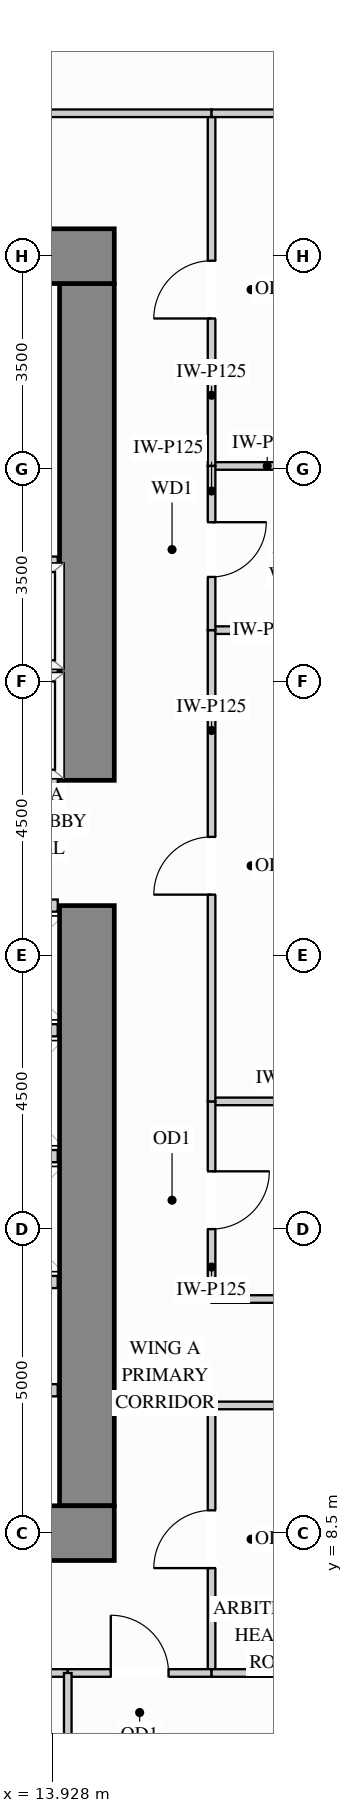
"""IFC4 building model, lengths in metres.
Left out: names, types, materials, properties, quantities, classifications, styles, units other than length and angle.
Written with IfcOpenShell. Run it as: python <this file> out.ifc"""

import sys

from ifc_helpers import new_model, si_unit, direction, frame, frame_2d, origin, place, context, subcontext, project, spatial, rectangle, extrude, source, transform, mapped, element, fill, save


model = new_model("IFC4")
c1 = context("Model", 3, precision=1e-05, world=origin(), true_north=direction((0.0, 1.0)))
c2 = subcontext(c1, "Body", "Model", "MODEL_VIEW")
j1 = project(units=[si_unit("LENGTHUNIT", "METRE"), si_unit("PLANEANGLEUNIT", "RADIAN")], contexts=[c1])
p1 = place(None, origin())
s1 = spatial("IfcSite", under=j1, at=p1, CompositionType="ELEMENT")
p2 = place(p1, origin())
s2 = spatial("IfcBuilding", under=s1, at=p2, CompositionType="ELEMENT")
p3 = place(p2, frame((0.0, 0.0, 51.3)))
s3 = spatial("IfcBuildingStorey", under=s2, at=p3, CompositionType="ELEMENT", Elevation=51.3)
m1 = source(origin(), c2, "Body", "SweptSolid", [
    extrude(rectangle(XDim=9.87, YDim=0.9, at=frame_2d((4.935, 0.0))), origin(), (0.0, 0.0, 1.0), 3.38),
])
p4 = place(p3, frame((14.5, 8.95, 0.0), z_axis=(0.0, 0.0, 1.0), x_axis=(0.0, 1.0, 0.0)))
e1 = element("IfcWall", 1, at=p4, inside=s3, PredefinedType="SHEAR", context=c2, shape_type="MappedRepresentation", body=[
    mapped(m1, transform((0.0, 0.0, 0.0), x_axis=(1.0, 0.0, 0.0), y_axis=(0.0, 1.0, 0.0), z_axis=(0.0, 0.0, 1.0))),
])
m2 = source(origin(), c2, "Body", "SweptSolid", [
    extrude(rectangle(XDim=8.17, YDim=0.9, at=frame_2d((4.085, 0.0))), origin(), (0.0, 0.0, 1.0), 3.38),
])
p5 = place(p3, frame((14.5, 20.88, 0.0), z_axis=(0.0, 0.0, 1.0), x_axis=(0.0, 1.0, 0.0)))
e2 = element("IfcWall", 2, at=p5, inside=s3, PredefinedType="SHEAR", context=c2, shape_type="MappedRepresentation", body=[
    mapped(m2, transform((0.0, 0.0, 0.0), x_axis=(1.0, 0.0, 0.0), y_axis=(0.0, 1.0, 0.0), z_axis=(0.0, 0.0, 1.0))),
])
m3 = source(origin(), c2, "Body", "SweptSolid", [
    extrude(rectangle(XDim=10.9, YDim=0.9, at=frame_2d((5.45, 0.0))), origin(), (0.0, 0.0, 1.0), 3.38),
])
for number, where, z_axis, x_axis in (
    (3, (4.05, 29.5, 0.0), (0.0, 0.0, 1.0), (1.0, 0.0, 0.0)),
    (4, (4.05, 8.5, 0.0), (0.0, 0.0, 1.0), (1.0, 0.0, 0.0)),
):
    element("IfcWall", number, at=place(p3, frame(where, z_axis=z_axis, x_axis=x_axis)), inside=s3, PredefinedType="SHEAR", context=c2, shape_type="MappedRepresentation", body=[
        mapped(m3, transform((0.0, 0.0, 0.0), x_axis=(1.0, 0.0, 0.0), y_axis=(0.0, 1.0, 0.0), z_axis=(0.0, 0.0, 1.0))),
    ])
m4 = source(origin(), c2, "Body", "SweptSolid", [
    extrude(rectangle(XDim=2.6, YDim=0.125, at=frame_2d((1.3, 0.0))), origin(), (0.0, 0.0, 1.0), 3.365),
])
p6 = place(p3, frame((16.55, 15.6, 0.0), z_axis=(0.0, 0.0, 1.0), x_axis=(1.0, 0.0, 0.0)))
e5 = element("IfcWall", 5, at=p6, inside=s3, PredefinedType="PARTITIONING", context=c2, shape_type="MappedRepresentation", body=[
    mapped(m4, transform((0.0, 0.0, 0.0), x_axis=(1.0, 0.0, 0.0), y_axis=(0.0, 1.0, 0.0), z_axis=(0.0, 0.0, 1.0))),
])
m5 = source(origin(), c2, "Body", "SweptSolid", [
    extrude(rectangle(XDim=2.598, YDim=0.125, at=frame_2d((1.299, 0.0))), origin(), (0.0, 0.0, 1.0), 3.365),
])
for number, where, z_axis, x_axis in (
    (6, (16.55, 23.35, 0.0), (0.0, 0.0, 1.0), (1.0, 0.0, 0.0)),
    (7, (16.55, 26.05, 0.0), (0.0, 0.0, 1.0), (1.0, 0.0, 0.0)),
):
    element("IfcWall", number, at=place(p3, frame(where, z_axis=z_axis, x_axis=x_axis)), inside=s3, PredefinedType="PARTITIONING", context=c2, shape_type="MappedRepresentation", body=[
        mapped(m5, transform((0.0, 0.0, 0.0), x_axis=(1.0, 0.0, 0.0), y_axis=(0.0, 1.0, 0.0), z_axis=(0.0, 0.0, 1.0))),
    ])
p7 = place(p3, frame((16.55, 12.35, 0.0), z_axis=(0.0, 0.0, 1.0), x_axis=(0.0, 1.0, 0.0)))
e8 = element("IfcWall", 8, at=p7, inside=s3, PredefinedType="PARTITIONING", context=c2, shape_type="SweptSolid", body=[
    extrude(rectangle(XDim=3.25, YDim=0.125, at=frame_2d((1.625, 0.0))), origin(), (0.0, 0.0, 1.0), 3.365),
])
p8 = place(p7, frame((1.15, 0.0, 0.0)))
e9 = element("IfcOpeningElement", 9, at=p8, cuts=e8, PredefinedType="OPENING", context=c2, shape_type="SweptSolid", body=[
    extrude(rectangle(XDim=0.95, YDim=2.15, at=frame_2d((0.475, 1.075))), frame((0.0, 0.073, 0.0), z_axis=(0.0, -1.0, 0.0), x_axis=(1.0, 0.0, 0.0)), (0.0, 0.0, 1.0), 0.145),
])
p9 = place(p3, frame((16.55, 15.6, 0.0), z_axis=(0.0, 0.0, 1.0), x_axis=(0.0, 1.0, 0.0)))
e10 = element("IfcWall", 10, at=p9, inside=s3, PredefinedType="PARTITIONING", context=c2, shape_type="SweptSolid", body=[
    extrude(rectangle(XDim=7.75, YDim=0.125, at=frame_2d((3.875, 0.0))), origin(), (0.0, 0.0, 1.0), 3.365),
])
p10 = place(p9, frame((3.4, 0.0, 0.0)))
e11 = element("IfcOpeningElement", 11, at=p10, cuts=e10, PredefinedType="OPENING", context=c2, shape_type="SweptSolid", body=[
    extrude(rectangle(XDim=0.95, YDim=2.15, at=frame_2d((0.475, 1.075))), frame((0.0, 0.073, 0.0), z_axis=(0.0, -1.0, 0.0), x_axis=(1.0, 0.0, 0.0)), (0.0, 0.0, 1.0), 0.145),
])
p11 = place(p3, frame((16.55, 26.05, 0.0), z_axis=(0.0, 0.0, 1.0), x_axis=(0.0, 1.0, 0.0)))
e12 = element("IfcWall", 12, at=p11, inside=s3, PredefinedType="PARTITIONING", context=c2, shape_type="SweptSolid", body=[
    extrude(rectangle(XDim=5.8, YDim=0.125, at=frame_2d((2.9, 0.0))), origin(), (0.0, 0.0, 1.0), 3.365),
])
p12 = place(p11, frame((2.425, 0.0, 0.0)))
e13 = element("IfcOpeningElement", 13, at=p12, cuts=e12, PredefinedType="OPENING", context=c2, shape_type="SweptSolid", body=[
    extrude(rectangle(XDim=0.95, YDim=2.15, at=frame_2d((0.475, 1.075))), frame((0.0, 0.073, 0.0), z_axis=(0.0, -1.0, 0.0), x_axis=(1.0, 0.0, 0.0)), (0.0, 0.0, 1.0), 0.145),
])
p13 = place(p3, frame((16.55, 6.2, 0.0), z_axis=(0.0, 0.0, 1.0), x_axis=(0.0, 1.0, 0.0)))
e14 = element("IfcWall", 14, at=p13, inside=s3, PredefinedType="PARTITIONING", context=c2, shape_type="SweptSolid", body=[
    extrude(rectangle(XDim=4.4, YDim=0.125, at=frame_2d((2.2, 0.0))), origin(), (0.0, 0.0, 1.0), 3.365),
])
p14 = place(p13, frame((1.725, 0.0, 0.0)))
e15 = element("IfcOpeningElement", 15, at=p14, cuts=e14, PredefinedType="OPENING", context=c2, shape_type="SweptSolid", body=[
    extrude(rectangle(XDim=0.95, YDim=2.15, at=frame_2d((0.475, 1.075))), frame((0.0, 0.073, 0.0), z_axis=(0.0, -1.0, 0.0), x_axis=(1.0, 0.0, 0.0)), (0.0, 0.0, 1.0), 0.145),
])
p15 = place(p3, frame((16.55, 23.35, 0.0), z_axis=(0.0, 0.0, 1.0), x_axis=(0.0, 1.0, 0.0)))
e16 = element("IfcWall", 16, at=p15, inside=s3, PredefinedType="PARTITIONING", context=c2, shape_type="SweptSolid", body=[
    extrude(rectangle(XDim=2.7, YDim=0.125, at=frame_2d((1.35, 0.0))), origin(), (0.0, 0.0, 1.0), 3.365),
])
p16 = place(p15, frame((0.875, 0.0, 0.0)))
e17 = element("IfcOpeningElement", 17, at=p16, cuts=e16, PredefinedType="OPENING", context=c2, shape_type="SweptSolid", body=[
    extrude(rectangle(XDim=0.9, YDim=2.15, at=frame_2d((0.45, 1.075))), frame((0.0, 0.073, 0.0), z_axis=(0.0, -1.0, 0.0), x_axis=(1.0, 0.0, 0.0)), (0.0, 0.0, 1.0), 0.145),
])
p17 = place(p3, frame((2.45, 31.85, 0.0), z_axis=(0.0, 0.0, 1.0), x_axis=(1.0, 0.0, 0.0)))
e18 = element("IfcWall", 18, at=p17, inside=s3, PredefinedType="PARTITIONING", context=c2, shape_type="SweptSolid", body=[
    extrude(rectangle(XDim=14.1, YDim=0.125, at=frame_2d((7.05, 0.0))), origin(), (0.0, 0.0, 1.0), 2.828),
])
p18 = place(p17, frame((6.575, 0.0, 0.0)))
e19 = element("IfcOpeningElement", 19, at=p18, cuts=e18, PredefinedType="OPENING", context=c2, shape_type="SweptSolid", body=[
    extrude(rectangle(XDim=0.95, YDim=2.15, at=frame_2d((0.475, 1.075))), frame((0.0, 0.073, 0.0), z_axis=(0.0, -1.0, 0.0), x_axis=(1.0, 0.0, 0.0)), (0.0, 0.0, 1.0), 0.145),
])
m6 = source(origin(), c2, "Body", "SweptSolid", [
    extrude(rectangle(XDim=2.598, YDim=0.125, at=frame_2d((1.299, 0.0))), origin(), (0.0, 0.0, 1.0), 2.828),
])
p19 = place(p3, frame((16.55, 31.85, 0.0), z_axis=(0.0, 0.0, 1.0), x_axis=(1.0, 0.0, 0.0)))
e20 = element("IfcWall", 20, at=p19, inside=s3, PredefinedType="PARTITIONING", context=c2, shape_type="MappedRepresentation", body=[
    mapped(m6, transform((0.0, 0.0, 0.0), x_axis=(1.0, 0.0, 0.0), y_axis=(0.0, 1.0, 0.0), z_axis=(0.0, 0.0, 1.0))),
])
m7 = source(origin(), c2, "Body", "SweptSolid", [
    extrude(rectangle(XDim=2.95, YDim=0.125, at=frame_2d((1.475, 0.0))), origin(), (0.0, 0.0, 1.0), 3.365),
])
for number, where, z_axis, x_axis in (
    (21, (16.55, 12.35, 0.0), (0.0, 0.0, 1.0), (1.0, 0.0, 0.0)),
    (22, (16.55, 10.6, 0.0), (0.0, 0.0, 1.0), (1.0, 0.0, 0.0)),
):
    element("IfcWall", number, at=place(p3, frame(where, z_axis=z_axis, x_axis=x_axis)), inside=s3, PredefinedType="PARTITIONING", context=c2, shape_type="MappedRepresentation", body=[
        mapped(m7, transform((0.0, 0.0, 0.0), x_axis=(1.0, 0.0, 0.0), y_axis=(0.0, 1.0, 0.0), z_axis=(0.0, 0.0, 1.0))),
    ])
p20 = place(p3, frame((10.544, 6.2, 0.0), z_axis=(0.0, 0.0, 1.0), x_axis=(1.0, 0.0, 0.0)))
e23 = element("IfcWall", 23, at=p20, inside=s3, PredefinedType="PARTITIONING", context=c2, shape_type="SweptSolid", body=[
    extrude(rectangle(XDim=3.641, YDim=0.125, at=frame_2d((1.821, 0.0))), origin(), (0.0, 0.0, 1.0), 2.828),
])
p21 = place(p20, frame((1.345, 0.0, 0.0)))
e24 = element("IfcOpeningElement", 24, at=p21, cuts=e23, PredefinedType="OPENING", context=c2, shape_type="SweptSolid", body=[
    extrude(rectangle(XDim=0.95, YDim=2.15, at=frame_2d((0.475, 1.075))), frame((0.0, 0.073, 0.0), z_axis=(0.0, -1.0, 0.0), x_axis=(1.0, 0.0, 0.0)), (0.0, 0.0, 1.0), 0.145),
])
p22 = place(p3, frame((14.185, 6.2, 0.0), z_axis=(0.0, 0.0, 1.0), x_axis=(1.0, 0.0, 0.0)))
e25 = element("IfcWall", 25, at=p22, inside=s3, PredefinedType="PARTITIONING", context=c2, shape_type="SweptSolid", body=[
    extrude(rectangle(XDim=2.365, YDim=0.125, at=frame_2d((1.183, 0.0))), origin(), (0.0, 0.0, 1.0), 2.828),
])
p23 = place(p22, frame((0.708, 0.0, 0.0)))
e26 = element("IfcOpeningElement", 26, at=p23, cuts=e25, PredefinedType="OPENING", context=c2, shape_type="SweptSolid", body=[
    extrude(rectangle(XDim=0.95, YDim=2.15, at=frame_2d((0.475, 1.075))), frame((0.0, 0.073, 0.0), z_axis=(0.0, -1.0, 0.0), x_axis=(1.0, 0.0, 0.0)), (0.0, 0.0, 1.0), 0.145),
])
p24 = place(p3, frame((16.55, 6.2, 0.0), z_axis=(0.0, 0.0, 1.0), x_axis=(1.0, 0.0, 0.0)))
e27 = element("IfcWall", 27, at=p24, inside=s3, PredefinedType="PARTITIONING", context=c2, shape_type="MappedRepresentation", body=[
    mapped(m6, transform((0.0, 0.0, 0.0), x_axis=(1.0, 0.0, 0.0), y_axis=(0.0, 1.0, 0.0), z_axis=(0.0, 0.0, 1.0))),
])
m8 = source(origin(), c2, "Body", "SweptSolid", [
    extrude(rectangle(XDim=4.94, YDim=0.125, at=frame_2d((2.47, 0.0))), origin(), (0.0, 0.0, 1.0), 3.365),
])
p25 = place(p3, frame((14.185, 1.26, 0.0), z_axis=(0.0, 0.0, 1.0), x_axis=(0.0, 1.0, 0.0)))
e28 = element("IfcWall", 28, at=p25, inside=s3, PredefinedType="PARTITIONING", context=c2, shape_type="MappedRepresentation", body=[
    mapped(m8, transform((0.0, 0.0, 0.0), x_axis=(1.0, 0.0, 0.0), y_axis=(0.0, 1.0, 0.0), z_axis=(0.0, 0.0, 1.0))),
])
m9 = source(origin(), c2, "Body", "SweptSolid", [
    extrude(rectangle(XDim=1.6, YDim=0.2, at=frame_2d((0.8, 0.0))), origin(), (0.0, 0.0, 1.0), 3.365),
])
p26 = place(p3, frame((12.42, 10.85, 0.0), z_axis=(0.0, 0.0, 1.0), x_axis=(1.0, 0.0, 0.0)))
e29 = element("IfcWall", 29, at=p26, inside=s3, PredefinedType="PARTITIONING", context=c2, shape_type="MappedRepresentation", body=[
    mapped(m9, transform((0.0, 0.0, 0.0), x_axis=(1.0, 0.0, 0.0), y_axis=(0.0, 1.0, 0.0), z_axis=(0.0, 0.0, 1.0))),
])
m10 = source(origin(), c2, "Body", "SweptSolid", [
    extrude(rectangle(XDim=2.19, YDim=0.2, at=frame_2d((1.095, 0.0))), origin(), (0.0, 0.0, 1.0), 3.365),
])
for number, where, z_axis, x_axis in (
    (30, (11.83, 22.66, 0.0), (0.0, 0.0, 1.0), (1.0, 0.0, 0.0)),
    (31, (11.83, 20.9, 0.0), (0.0, 0.0, 1.0), (1.0, 0.0, 0.0)),
    (32, (11.83, 24.46, 0.0), (0.0, 0.0, 1.0), (1.0, 0.0, 0.0)),
):
    element("IfcWall", number, at=place(p3, frame(where, z_axis=z_axis, x_axis=x_axis)), inside=s3, PredefinedType="PARTITIONING", context=c2, shape_type="MappedRepresentation", body=[
        mapped(m10, transform((0.0, 0.0, 0.0), x_axis=(1.0, 0.0, 0.0), y_axis=(0.0, 1.0, 0.0), z_axis=(0.0, 0.0, 1.0))),
    ])
m11 = source(origin(), c2, "Body", "SweptSolid", [
    extrude(rectangle(XDim=1.79, YDim=0.2, at=frame_2d((0.895, 0.0))), origin(), (0.0, 0.0, 1.0), 3.365),
])
for number, where, z_axis, x_axis in (
    (33, (12.23, 14.7, 0.0), (0.0, 0.0, 1.0), (1.0, 0.0, 0.0)),
    (34, (12.23, 12.63, 0.0), (0.0, 0.0, 1.0), (1.0, 0.0, 0.0)),
    (35, (12.23, 16.77, 0.0), (0.0, 0.0, 1.0), (1.0, 0.0, 0.0)),
    (36, (12.23, 18.82, 0.0), (0.0, 0.0, 1.0), (1.0, 0.0, 0.0)),
):
    element("IfcWall", number, at=place(p3, frame(where, z_axis=z_axis, x_axis=x_axis)), inside=s3, PredefinedType="PARTITIONING", context=c2, shape_type="MappedRepresentation", body=[
        mapped(m11, transform((0.0, 0.0, 0.0), x_axis=(1.0, 0.0, 0.0), y_axis=(0.0, 1.0, 0.0), z_axis=(0.0, 0.0, 1.0))),
    ])
m12 = source(origin(), c2, "Body", "SweptSolid", [
    extrude(rectangle(XDim=0.95, YDim=2.15, at=frame_2d((0.475, 1.075))), frame((0.0, 0.025, 0.0), z_axis=(0.0, -1.0, 0.0), x_axis=(1.0, 0.0, 0.0)), (0.0, 0.0, 1.0), 0.05),
])
p27 = place(p14, origin())
e37 = element("IfcDoor", 37, at=p27, inside=s3, OperationType="SINGLE_SWING_LEFT", PredefinedType="DOOR", context=c2, shape_type="MappedRepresentation", body=[
    mapped(m12, transform((0.0, 0.0, 0.0), x_axis=(1.0, 0.0, 0.0), y_axis=(0.0, 1.0, 0.0), z_axis=(0.0, 0.0, 1.0))),
])
fill(e15, e37)
p28 = place(p8, origin())
e38 = element("IfcDoor", 38, at=p28, inside=s3, OperationType="SINGLE_SWING_RIGHT", PredefinedType="DOOR", context=c2, shape_type="MappedRepresentation", body=[
    mapped(m12, transform((0.0, 0.0, 0.0), x_axis=(1.0, 0.0, 0.0), y_axis=(0.0, 1.0, 0.0), z_axis=(0.0, 0.0, 1.0))),
])
fill(e9, e38)
p29 = place(p10, origin())
e39 = element("IfcDoor", 39, at=p29, inside=s3, OperationType="SINGLE_SWING_LEFT", PredefinedType="DOOR", context=c2, shape_type="MappedRepresentation", body=[
    mapped(m12, transform((0.0, 0.0, 0.0), x_axis=(1.0, 0.0, 0.0), y_axis=(0.0, 1.0, 0.0), z_axis=(0.0, 0.0, 1.0))),
])
fill(e11, e39)
p30 = place(p12, origin())
e40 = element("IfcDoor", 40, at=p30, inside=s3, OperationType="SINGLE_SWING_LEFT", PredefinedType="DOOR", context=c2, shape_type="MappedRepresentation", body=[
    mapped(m12, transform((0.0, 0.0, 0.0), x_axis=(1.0, 0.0, 0.0), y_axis=(0.0, 1.0, 0.0), z_axis=(0.0, 0.0, 1.0))),
])
fill(e13, e40)
p31 = place(p23, origin())
e41 = element("IfcDoor", 41, at=p31, inside=s3, OperationType="SINGLE_SWING_LEFT", PredefinedType="DOOR", context=c2, shape_type="MappedRepresentation", body=[
    mapped(m12, transform((0.0, 0.0, 0.0), x_axis=(1.0, 0.0, 0.0), y_axis=(0.0, 1.0, 0.0), z_axis=(0.0, 0.0, 1.0))),
])
fill(e26, e41)
m13 = source(origin(), c2, "Body", "SweptSolid", [
    extrude(rectangle(XDim=0.9, YDim=2.15, at=frame_2d((0.45, 1.075))), frame((0.0, 0.025, 0.0), z_axis=(0.0, -1.0, 0.0), x_axis=(1.0, 0.0, 0.0)), (0.0, 0.0, 1.0), 0.05),
])
p32 = place(p16, origin())
e42 = element("IfcDoor", 42, at=p32, inside=s3, OperationType="SINGLE_SWING_RIGHT", PredefinedType="DOOR", context=c2, shape_type="MappedRepresentation", body=[
    mapped(m13, transform((0.0, 0.0, 0.0), x_axis=(1.0, 0.0, 0.0), y_axis=(0.0, 1.0, 0.0), z_axis=(0.0, 0.0, 1.0))),
])
fill(e17, e42)
save(model, sys.argv[1])
